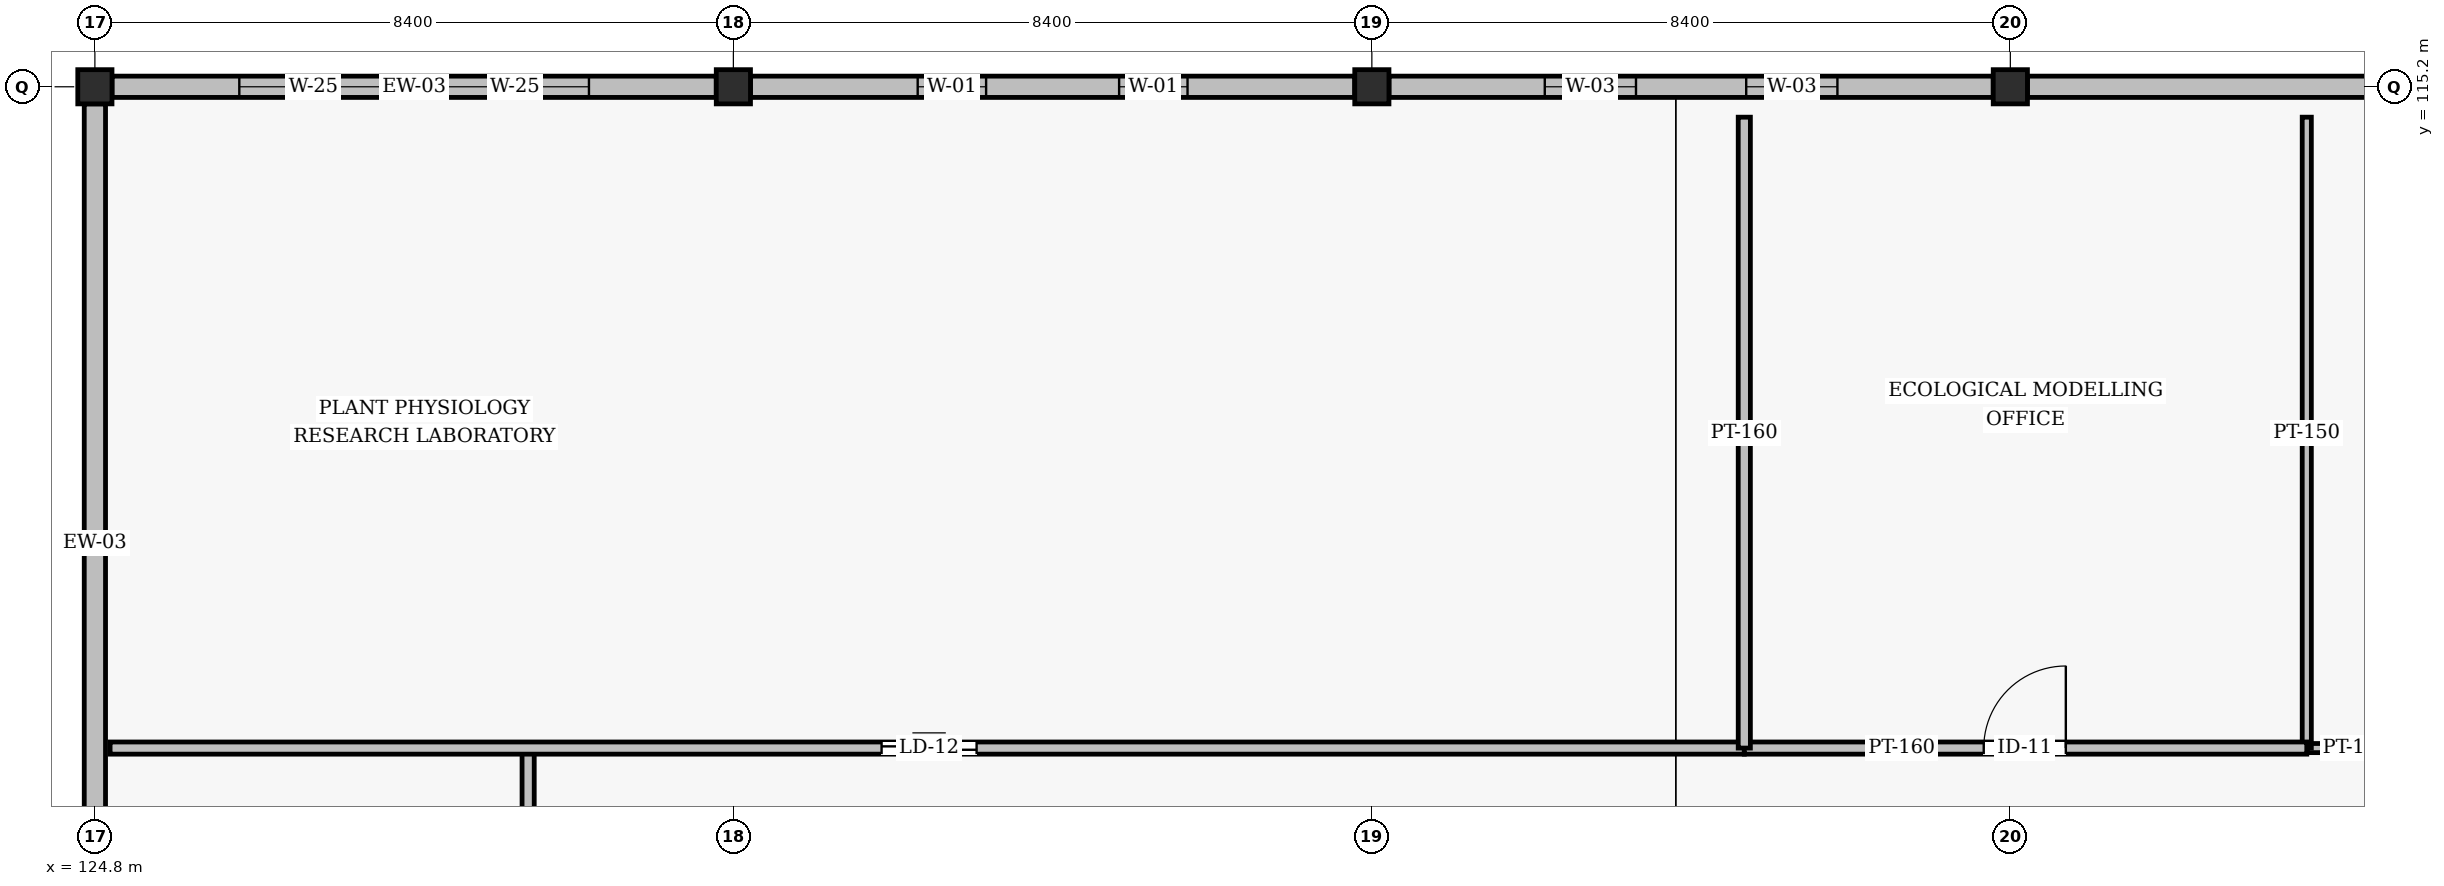
"""IFC4 building model, lengths in metres.
Left out: names, types, materials, properties, quantities, classifications, styles, units other than length and angle.
Written with IfcOpenShell. Run it as: python <this file> out.ifc"""

import sys

from ifc_helpers import new_model, si_unit, direction, frame, frame_2d, origin, origin_2d, place, context, subcontext, project, spatial, rectangle, hollow_rectangle, extrude, element, fill, save


model = new_model("IFC4")
c1 = context("Model", 3, precision=1e-05, world=origin(), true_north=direction((0.0, 1.0)))
c2 = subcontext(c1, "Body", "Model", "MODEL_VIEW")
j1 = project(units=[si_unit("LENGTHUNIT", "METRE"), si_unit("PLANEANGLEUNIT", "RADIAN")], contexts=[c1])
p1 = place(None, origin())
s1 = spatial("IfcSite", under=j1, at=p1, CompositionType="ELEMENT")
p2 = place(p1, origin())
s2 = spatial("IfcBuilding", under=s1, at=p2, CompositionType="ELEMENT")
p3 = place(p2, frame((0.0, 0.0, 43.2)))
s3 = spatial("IfcBuildingStorey", under=s2, at=p3, CompositionType="ELEMENT", Elevation=43.2)
for number, where, z_axis, x_axis in (
    (1, (124.8, 115.2, 0.0), (0.0, 0.0, 1.0), (1.0, 0.0, 0.0)),
    (2, (133.2, 115.2, 0.0), (0.0, 0.0, 1.0), (1.0, 0.0, 0.0)),
    (3, (141.6, 115.2, 0.0), (0.0, 0.0, 1.0), (1.0, 0.0, 0.0)),
    (4, (150.0, 115.2, 0.0), (0.0, 0.0, 1.0), (1.0, 0.0, 0.0)),
):
    element("IfcColumn", number, at=place(p3, frame(where, z_axis=z_axis, x_axis=x_axis)), inside=s3, PredefinedType="COLUMN", context=c2, shape_type="SweptSolid", body=[
        extrude(hollow_rectangle(XDim=0.45, YDim=0.45, WallThickness=0.018, InnerFilletRadius=0.018, OuterFilletRadius=0.036, at=origin_2d()), origin(), (0.0, 0.0, 1.0), 3.6),
    ])
p4 = place(p3, frame((158.775, 115.2, 0.0), z_axis=(0.0, 0.0, 1.0), x_axis=(-1.0, 0.0, 0.0)))
e5 = element("IfcWall", 5, at=p4, inside=s3, PredefinedType="SOLIDWALL", context=c2, shape_type="SweptSolid", body=[
    extrude(rectangle(XDim=8.55, YDim=0.28, at=frame_2d((4.275, 0.0))), origin(), (0.0, 0.0, 1.0), 2.562),
])
p5 = place(p3, frame((149.775, 115.2, 0.0), z_axis=(0.0, 0.0, 1.0), x_axis=(-1.0, 0.0, 0.0)))
e6 = element("IfcWall", 6, at=p5, inside=s3, PredefinedType="SOLIDWALL", context=c2, shape_type="SweptSolid", body=[
    extrude(rectangle(XDim=7.95, YDim=0.28, at=frame_2d((3.975, 0.0))), origin(), (0.0, 0.0, 1.0), 2.854),
])
p6 = place(p5, frame((2.05, 0.0, 0.85)))
e7 = element("IfcOpeningElement", 7, at=p6, cuts=e6, PredefinedType="OPENING", context=c2, shape_type="SweptSolid", body=[
    extrude(rectangle(XDim=1.2, YDim=1.7, at=frame_2d((0.6, 0.85))), frame((0.0, 0.15, 0.0), z_axis=(0.0, -1.0, 0.0), x_axis=(1.0, 0.0, 0.0)), (0.0, 0.0, 1.0), 0.3),
])
p7 = place(p5, frame((4.7, 0.0, 0.85)))
e8 = element("IfcOpeningElement", 8, at=p7, cuts=e6, PredefinedType="OPENING", context=c2, shape_type="SweptSolid", body=[
    extrude(rectangle(XDim=1.2, YDim=1.7, at=frame_2d((0.6, 0.85))), frame((0.0, 0.15, 0.0), z_axis=(0.0, -1.0, 0.0), x_axis=(1.0, 0.0, 0.0)), (0.0, 0.0, 1.0), 0.3),
])
p8 = place(p3, frame((141.375, 115.2, 0.0), z_axis=(0.0, 0.0, 1.0), x_axis=(-1.0, 0.0, 0.0)))
e9 = element("IfcWall", 9, at=p8, inside=s3, PredefinedType="SOLIDWALL", context=c2, shape_type="SweptSolid", body=[
    extrude(rectangle(XDim=7.95, YDim=0.28, at=frame_2d((3.975, 0.0))), origin(), (0.0, 0.0, 1.0), 2.854),
])
p9 = place(p8, frame((2.2, 0.0, 0.95)))
e10 = element("IfcOpeningElement", 10, at=p9, cuts=e9, PredefinedType="OPENING", context=c2, shape_type="SweptSolid", body=[
    extrude(rectangle(XDim=0.9, YDim=1.6, at=frame_2d((0.45, 0.8))), frame((0.0, 0.15, 0.0), z_axis=(0.0, -1.0, 0.0), x_axis=(1.0, 0.0, 0.0)), (0.0, 0.0, 1.0), 0.3),
])
p10 = place(p8, frame((4.85, 0.0, 0.95)))
e11 = element("IfcOpeningElement", 11, at=p10, cuts=e9, PredefinedType="OPENING", context=c2, shape_type="SweptSolid", body=[
    extrude(rectangle(XDim=0.9, YDim=1.6, at=frame_2d((0.45, 0.8))), frame((0.0, 0.15, 0.0), z_axis=(0.0, -1.0, 0.0), x_axis=(1.0, 0.0, 0.0)), (0.0, 0.0, 1.0), 0.3),
])
p11 = place(p3, frame((132.975, 115.2, 0.0), z_axis=(0.0, 0.0, 1.0), x_axis=(-1.0, 0.0, 0.0)))
e12 = element("IfcWall", 12, at=p11, inside=s3, PredefinedType="SOLIDWALL", context=c2, shape_type="SweptSolid", body=[
    extrude(rectangle(XDim=7.95, YDim=0.28, at=frame_2d((3.975, 0.0))), origin(), (0.0, 0.0, 1.0), 2.854),
])
p12 = place(p11, frame((1.675, 0.0, 0.8)))
e13 = element("IfcOpeningElement", 13, at=p12, cuts=e12, PredefinedType="OPENING", context=c2, shape_type="SweptSolid", body=[
    extrude(rectangle(XDim=1.95, YDim=1.75, at=frame_2d((0.975, 0.875))), frame((0.0, 0.15, 0.0), z_axis=(0.0, -1.0, 0.0), x_axis=(1.0, 0.0, 0.0)), (0.0, 0.0, 1.0), 0.3),
])
p13 = place(p11, frame((4.325, 0.0, 0.8)))
e14 = element("IfcOpeningElement", 14, at=p13, cuts=e12, PredefinedType="OPENING", context=c2, shape_type="SweptSolid", body=[
    extrude(rectangle(XDim=1.95, YDim=1.75, at=frame_2d((0.975, 0.875))), frame((0.0, 0.15, 0.0), z_axis=(0.0, -1.0, 0.0), x_axis=(1.0, 0.0, 0.0)), (0.0, 0.0, 1.0), 0.3),
])
p14 = place(p3, frame((124.8, 114.975, 0.0), z_axis=(0.0, 0.0, 1.0), x_axis=(0.0, -1.0, 0.0)))
e15 = element("IfcWall", 15, at=p14, inside=s3, PredefinedType="SOLIDWALL", context=c2, shape_type="SweptSolid", body=[
    extrude(rectangle(XDim=11.55, YDim=0.28, at=frame_2d((5.775, 0.0))), origin(), (0.0, 0.0, 1.0), 2.562),
])
p15 = place(p3, frame((153.9, 106.5, 0.0), z_axis=(0.0, 0.0, 1.0), x_axis=(1.0, 0.0, 0.0)))
e16 = element("IfcWall", 16, at=p15, inside=s3, PredefinedType="PARTITIONING", context=c2, shape_type="SweptSolid", body=[
    extrude(rectangle(XDim=3.6, YDim=0.12, at=frame_2d((1.8, 0.0))), origin(), (0.0, 0.0, 1.0), 3.354),
])
p16 = place(p15, frame((1.35, 0.0, 0.0)))
e17 = element("IfcOpeningElement", 17, at=p16, cuts=e16, PredefinedType="OPENING", context=c2, shape_type="SweptSolid", body=[
    extrude(rectangle(XDim=0.9, YDim=2.1, at=frame_2d((0.45, 1.05))), frame((0.0, 0.07, 0.0), z_axis=(0.0, -1.0, 0.0), x_axis=(1.0, 0.0, 0.0)), (0.0, 0.0, 1.0), 0.14),
])
p17 = place(p3, frame((153.9, 106.5, 0.0), z_axis=(0.0, 0.0, 1.0), x_axis=(0.0, 1.0, 0.0)))
e18 = element("IfcWall", 18, at=p17, inside=s3, PredefinedType="PARTITIONING", context=c2, shape_type="SweptSolid", body=[
    extrude(rectangle(XDim=8.3, YDim=0.12, at=frame_2d((4.15, 0.0))), origin(), (0.0, 0.0, 1.0), 2.958),
])
p18 = place(p3, frame((130.5, 92.3, 0.0), z_axis=(0.0, 0.0, 1.0), x_axis=(0.0, 1.0, 0.0)))
e19 = element("IfcWall", 19, at=p18, inside=s3, PredefinedType="PARTITIONING", context=c2, shape_type="SweptSolid", body=[
    extrude(rectangle(XDim=14.2, YDim=0.16, at=frame_2d((7.1, 0.0))), origin(), (0.0, 0.0, 1.0), 2.858),
])
p19 = place(p18, frame((6.55, 0.0, 0.0)))
e20 = element("IfcOpeningElement", 20, at=p19, cuts=e19, PredefinedType="OPENING", context=c2, shape_type="SweptSolid", body=[
    extrude(rectangle(XDim=1.14, YDim=2.12, at=frame_2d((0.57, 1.06))), frame((0.0, 0.09, 0.0), z_axis=(0.0, -1.0, 0.0), x_axis=(1.0, 0.0, 0.0)), (0.0, 0.0, 1.0), 0.18),
])
p20 = place(p3, frame((125.0, 106.5, 0.0), z_axis=(0.0, 0.0, 1.0), x_axis=(1.0, 0.0, 0.0)))
e21 = element("IfcWall", 21, at=p20, inside=s3, PredefinedType="PARTITIONING", context=c2, shape_type="SweptSolid", body=[
    extrude(rectangle(XDim=21.5, YDim=0.16, at=frame_2d((10.75, 0.0))), origin(), (0.0, 0.0, 1.0), 2.654),
])
p21 = place(p20, frame((10.15, 0.0, 0.0)))
e22 = element("IfcOpeningElement", 22, at=p21, cuts=e21, PredefinedType="OPENING", context=c2, shape_type="SweptSolid", body=[
    extrude(rectangle(XDim=1.25, YDim=2.12, at=frame_2d((0.625, 1.06))), frame((0.0, 0.09, 0.0), z_axis=(0.0, -1.0, 0.0), x_axis=(1.0, 0.0, 0.0)), (0.0, 0.0, 1.0), 0.18),
])
p22 = place(p3, frame((146.5, 106.5, 0.0), z_axis=(0.0, 0.0, 1.0), x_axis=(1.0, 0.0, 0.0)))
e23 = element("IfcWall", 23, at=p22, inside=s3, PredefinedType="PARTITIONING", context=c2, shape_type="SweptSolid", body=[
    extrude(rectangle(XDim=7.4, YDim=0.16, at=frame_2d((3.7, 0.0))), origin(), (0.0, 0.0, 1.0), 2.654),
])
p23 = place(p22, frame((3.15, 0.0, 0.0)))
e24 = element("IfcOpeningElement", 24, at=p23, cuts=e23, PredefinedType="OPENING", context=c2, shape_type="SweptSolid", body=[
    extrude(rectangle(XDim=1.08, YDim=2.08, at=frame_2d((0.54, 1.04))), frame((0.0, 0.09, 0.0), z_axis=(0.0, -1.0, 0.0), x_axis=(1.0, 0.0, 0.0)), (0.0, 0.0, 1.0), 0.18),
])
p24 = place(p3, frame((146.5, 106.5, 0.0), z_axis=(0.0, 0.0, 1.0), x_axis=(0.0, 1.0, 0.0)))
e25 = element("IfcWall", 25, at=p24, inside=s3, PredefinedType="PARTITIONING", context=c2, shape_type="SweptSolid", body=[
    extrude(rectangle(XDim=8.3, YDim=0.16, at=frame_2d((4.15, 0.0))), origin(), (0.0, 0.0, 1.0), 3.008),
])
p25 = place(p6, origin())
e26 = element("IfcWindow", 26, at=p25, inside=s3, PartitioningType="SINGLE_PANEL", PredefinedType="WINDOW", context=c2, shape_type="SweptSolid", body=[
    extrude(rectangle(XDim=1.2, YDim=1.7, at=frame_2d((0.6, 0.85))), frame((0.0, 0.03, 0.0), z_axis=(0.0, -1.0, 0.0), x_axis=(1.0, 0.0, 0.0)), (0.0, 0.0, 1.0), 0.06),
])
fill(e7, e26)
p26 = place(p7, origin())
e27 = element("IfcWindow", 27, at=p26, inside=s3, PartitioningType="SINGLE_PANEL", PredefinedType="WINDOW", context=c2, shape_type="SweptSolid", body=[
    extrude(rectangle(XDim=1.2, YDim=1.7, at=frame_2d((0.6, 0.85))), frame((0.0, 0.03, 0.0), z_axis=(0.0, -1.0, 0.0), x_axis=(1.0, 0.0, 0.0)), (0.0, 0.0, 1.0), 0.06),
])
fill(e8, e27)
p27 = place(p9, origin())
e28 = element("IfcWindow", 28, at=p27, inside=s3, PartitioningType="SINGLE_PANEL", PredefinedType="WINDOW", context=c2, shape_type="SweptSolid", body=[
    extrude(rectangle(XDim=0.9, YDim=1.6, at=frame_2d((0.45, 0.8))), frame((0.0, 0.03, 0.0), z_axis=(0.0, -1.0, 0.0), x_axis=(1.0, 0.0, 0.0)), (0.0, 0.0, 1.0), 0.06),
])
fill(e10, e28)
p28 = place(p10, origin())
e29 = element("IfcWindow", 29, at=p28, inside=s3, PartitioningType="SINGLE_PANEL", PredefinedType="WINDOW", context=c2, shape_type="SweptSolid", body=[
    extrude(rectangle(XDim=0.9, YDim=1.6, at=frame_2d((0.45, 0.8))), frame((0.0, 0.03, 0.0), z_axis=(0.0, -1.0, 0.0), x_axis=(1.0, 0.0, 0.0)), (0.0, 0.0, 1.0), 0.06),
])
fill(e11, e29)
p29 = place(p12, origin())
e30 = element("IfcWindow", 30, at=p29, inside=s3, PartitioningType="SINGLE_PANEL", PredefinedType="WINDOW", context=c2, shape_type="SweptSolid", body=[
    extrude(rectangle(XDim=1.95, YDim=1.75, at=frame_2d((0.975, 0.875))), frame((0.0, 0.03, 0.0), z_axis=(0.0, -1.0, 0.0), x_axis=(1.0, 0.0, 0.0)), (0.0, 0.0, 1.0), 0.06),
])
fill(e13, e30)
p30 = place(p13, origin())
e31 = element("IfcWindow", 31, at=p30, inside=s3, PartitioningType="SINGLE_PANEL", PredefinedType="WINDOW", context=c2, shape_type="SweptSolid", body=[
    extrude(rectangle(XDim=1.95, YDim=1.75, at=frame_2d((0.975, 0.875))), frame((0.0, 0.03, 0.0), z_axis=(0.0, -1.0, 0.0), x_axis=(1.0, 0.0, 0.0)), (0.0, 0.0, 1.0), 0.06),
])
fill(e14, e31)
p31 = place(p21, origin())
e32 = element("IfcDoor", 32, at=p31, inside=s3, OperationType="SINGLE_SWING_LEFT", PredefinedType="DOOR", context=c2, shape_type="SweptSolid", body=[
    extrude(rectangle(XDim=1.25, YDim=2.12, at=frame_2d((0.625, 1.06))), frame((0.0, 0.025, 0.0), z_axis=(0.0, -1.0, 0.0), x_axis=(1.0, 0.0, 0.0)), (0.0, 0.0, 1.0), 0.05),
])
fill(e22, e32)
p32 = place(p23, origin())
e33 = element("IfcDoor", 33, at=p32, inside=s3, OperationType="SINGLE_SWING_RIGHT", PredefinedType="DOOR", context=c2, shape_type="SweptSolid", body=[
    extrude(rectangle(XDim=1.08, YDim=2.08, at=frame_2d((0.54, 1.04))), frame((0.0, 0.025, 0.0), z_axis=(0.0, -1.0, 0.0), x_axis=(1.0, 0.0, 0.0)), (0.0, 0.0, 1.0), 0.05),
])
fill(e24, e33)
save(model, sys.argv[1])
